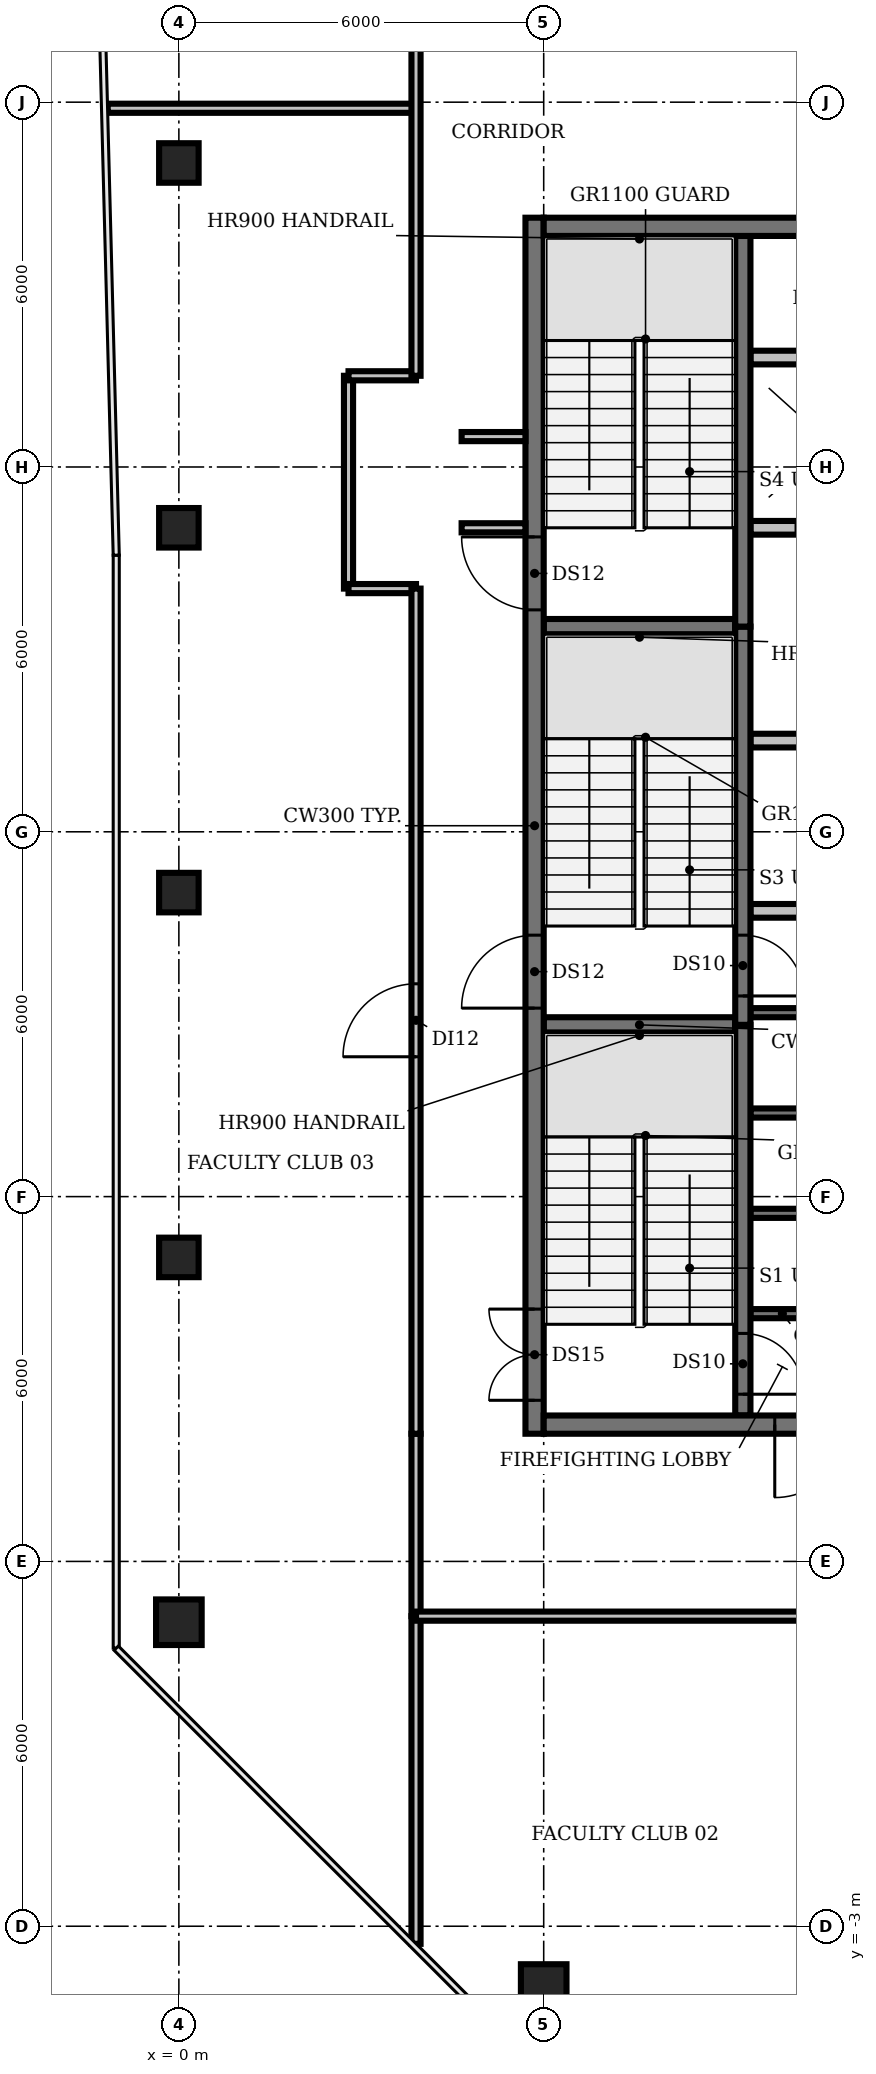
"""IFC4 building model, lengths in metres.
Left out: names, types, materials, properties, quantities, classifications, styles, units other than length and angle.
Written with IfcOpenShell. Run it as: python <this file> out.ifc"""

import sys

from ifc_helpers import new_model, si_unit, direction, frame, frame_2d, origin, origin_2d, place, context, subcontext, project, spatial, rectangle, circle, extrude, element, fill, save


model = new_model("IFC4")
c1 = context("Model", 3, precision=1e-05, world=origin(), true_north=direction((0.0, 1.0)))
c2 = subcontext(c1, "Body", "Model", "MODEL_VIEW")
j1 = project(units=[si_unit("LENGTHUNIT", "METRE"), si_unit("PLANEANGLEUNIT", "RADIAN")], contexts=[c1])
p1 = place(None, origin())
s1 = spatial("IfcSite", under=j1, at=p1, CompositionType="ELEMENT")
p2 = place(p1, origin())
s2 = spatial("IfcBuilding", under=s1, at=p2, CompositionType="ELEMENT")
p3 = place(p2, frame((0.0, 0.0, 327.2)))
s3 = spatial("IfcBuildingStorey", under=s2, at=p3, CompositionType="ELEMENT", Elevation=327.2)
p4 = place(p3, frame((0.0, 2.0, 0.0), z_axis=(0.0, 0.0, 1.0), x_axis=(1.0, 0.0, 0.0)))
e1 = element("IfcColumn", 1, at=p4, inside=s3, PredefinedType="COLUMN", context=c2, shape_type="SweptSolid", body=[
    extrude(circle(Radius=0.375, at=origin_2d()), origin(), (0.0, 0.0, 1.0), 3.9),
])
for number, where, z_axis, x_axis in (
    (2, (0.0, 8.0, 0.0), (0.0, 0.0, 1.0), (1.0, 0.0, 0.0)),
    (3, (0.0, 14.0, 0.0), (0.0, 0.0, 1.0), (1.0, 0.0, 0.0)),
    (4, (0.0, 20.0, 0.0), (0.0, 0.0, 1.0), (1.0, 0.0, 0.0)),
    (5, (0.0, 26.0, 0.0), (0.0, 0.0, 1.0), (1.0, 0.0, 0.0)),
):
    element("IfcColumn", number, at=place(p3, frame(where, z_axis=z_axis, x_axis=x_axis)), inside=s3, PredefinedType="COLUMN", context=c2, shape_type="SweptSolid", body=[
        extrude(rectangle(XDim=0.65, YDim=0.65, at=origin_2d()), origin(), (0.0, 0.0, 1.0), 3.9),
    ])
p5 = place(p3, frame((6.0, -4.0, 0.0), z_axis=(0.0, 0.0, 1.0), x_axis=(1.0, 0.0, 0.0)))
e6 = element("IfcColumn", 6, at=p5, inside=s3, PredefinedType="COLUMN", context=c2, shape_type="SweptSolid", body=[
    extrude(circle(Radius=0.375, at=origin_2d()), origin(), (0.0, 0.0, 1.0), 3.9),
])
for number, where, z_axis, x_axis in (
    (7, (9.4, 7.075, 0.0), (0.0, 0.0, 1.0), (1.0, 0.0, 0.0)),
    (8, (9.4, 8.725, 0.0), (0.0, 0.0, 1.0), (1.0, 0.0, 0.0)),
    (9, (9.4, 10.375, 0.0), (0.0, 0.0, 1.0), (1.0, 0.0, 0.0)),
):
    element("IfcWall", number, at=place(p3, frame(where, z_axis=z_axis, x_axis=x_axis)), inside=s3, PredefinedType="SHEAR", context=c2, shape_type="SweptSolid", body=[
        extrude(rectangle(XDim=1.05, YDim=0.15, at=frame_2d((0.525, 0.0))), origin(), (0.0, 0.0, 1.0), 3.9),
    ])
p6 = place(p3, frame((6.0, 11.825, 0.0), z_axis=(0.0, 0.0, 1.0), x_axis=(1.0, 0.0, 0.0)))
e10 = element("IfcWall", 10, at=p6, inside=s3, PredefinedType="SHEAR", context=c2, shape_type="SweptSolid", body=[
    extrude(rectangle(XDim=3.15, YDim=0.25, at=frame_2d((1.575, 0.0))), origin(), (0.0, 0.0, 1.0), 3.9),
])
p7 = place(p3, frame((9.4, 12.025, 0.0), z_axis=(0.0, 0.0, 1.0), x_axis=(1.0, 0.0, 0.0)))
e11 = element("IfcWall", 11, at=p7, inside=s3, PredefinedType="SHEAR", context=c2, shape_type="SweptSolid", body=[
    extrude(rectangle(XDim=1.05, YDim=0.15, at=frame_2d((0.525, 0.0))), origin(), (0.0, 0.0, 1.0), 3.9),
])
p8 = place(p3, frame((9.4, 13.7, 0.0), z_axis=(0.0, 0.0, 1.0), x_axis=(1.0, 0.0, 0.0)))
e12 = element("IfcWall", 12, at=p8, inside=s3, PredefinedType="PARTITIONING", context=c2, shape_type="SweptSolid", body=[
    extrude(rectangle(XDim=4.0, YDim=0.225, at=frame_2d((2.0, 0.0))), origin(), (0.0, 0.0, 1.0), 3.9),
])
p9 = place(p3, frame((9.4, 16.5, 0.0), z_axis=(0.0, 0.0, 1.0), x_axis=(1.0, 0.0, 0.0)))
e13 = element("IfcWall", 13, at=p9, inside=s3, PredefinedType="PARTITIONING", context=c2, shape_type="SweptSolid", body=[
    extrude(rectangle(XDim=14.6, YDim=0.225, at=frame_2d((7.3, 0.0))), origin(), (0.0, 0.0, 1.0), 3.9),
])
p10 = place(p9, frame((1.9, 0.0, 0.0)))
e14 = element("IfcOpeningElement", 14, at=p10, cuts=e13, PredefinedType="OPENING", context=c2, shape_type="SweptSolid", body=[
    extrude(rectangle(XDim=1.0, YDim=2.1, at=frame_2d((0.5, 1.05))), frame((0.0, 0.123, 0.0), z_axis=(0.0, -1.0, 0.0), x_axis=(1.0, 0.0, 0.0)), (0.0, 0.0, 1.0), 0.245),
])
p11 = place(p9, frame((7.475, 0.0, 0.0)))
e15 = element("IfcOpeningElement", 15, at=p11, cuts=e13, PredefinedType="OPENING", context=c2, shape_type="SweptSolid", body=[
    extrude(rectangle(XDim=1.0, YDim=2.1, at=frame_2d((0.5, 1.05))), frame((0.0, 0.123, 0.0), z_axis=(0.0, -1.0, 0.0), x_axis=(1.0, 0.0, 0.0)), (0.0, 0.0, 1.0), 0.245),
])
p12 = place(p9, frame((11.647, 0.0, 0.0)))
e16 = element("IfcOpeningElement", 16, at=p12, cuts=e13, PredefinedType="OPENING", context=c2, shape_type="SweptSolid", body=[
    extrude(rectangle(XDim=0.9, YDim=2.1, at=frame_2d((0.45, 1.05))), frame((0.0, 0.123, 0.0), z_axis=(0.0, -1.0, 0.0), x_axis=(1.0, 0.0, 0.0)), (0.0, 0.0, 1.0), 0.245),
])
p13 = place(p9, frame((13.423, 0.0, 0.0)))
e17 = element("IfcOpeningElement", 17, at=p13, cuts=e13, PredefinedType="OPENING", context=c2, shape_type="SweptSolid", body=[
    extrude(rectangle(XDim=0.9, YDim=2.1, at=frame_2d((0.45, 1.05))), frame((0.0, 0.123, 0.0), z_axis=(0.0, -1.0, 0.0), x_axis=(1.0, 0.0, 0.0)), (0.0, 0.0, 1.0), 0.245),
])
p14 = place(p3, frame((6.0, 18.375, 0.0), z_axis=(0.0, 0.0, 1.0), x_axis=(1.0, 0.0, 0.0)))
e18 = element("IfcWall", 18, at=p14, inside=s3, PredefinedType="SHEAR", context=c2, shape_type="SweptSolid", body=[
    extrude(rectangle(XDim=3.15, YDim=0.25, at=frame_2d((1.575, 0.0))), origin(), (0.0, 0.0, 1.0), 3.9),
])
p15 = place(p3, frame((24.0, 20.0, 0.0), z_axis=(0.0, 0.0, 1.0), x_axis=(-1.0, 0.0, 0.0)))
e19 = element("IfcWall", 19, at=p15, inside=s3, PredefinedType="PARTITIONING", context=c2, shape_type="SweptSolid", body=[
    extrude(rectangle(XDim=14.6, YDim=0.225, at=frame_2d((7.3, 0.0))), origin(), (0.0, 0.0, 1.0), 3.9),
])
p16 = place(p15, frame((12.75, 0.0, 0.0)))
e20 = element("IfcOpeningElement", 20, at=p16, cuts=e19, PredefinedType="OPENING", context=c2, shape_type="SweptSolid", body=[
    extrude(rectangle(XDim=1.1, YDim=2.1, at=frame_2d((0.55, 1.05))), frame((0.0, 0.123, 0.0), z_axis=(0.0, -1.0, 0.0), x_axis=(1.0, 0.0, 0.0)), (0.0, 0.0, 1.0), 0.245),
])
p17 = place(p15, frame((9.95, 0.0, 0.0)))
e21 = element("IfcOpeningElement", 21, at=p17, cuts=e19, PredefinedType="OPENING", context=c2, shape_type="SweptSolid", body=[
    extrude(rectangle(XDim=1.1, YDim=2.1, at=frame_2d((0.55, 1.05))), frame((0.0, 0.123, 0.0), z_axis=(0.0, -1.0, 0.0), x_axis=(1.0, 0.0, 0.0)), (0.0, 0.0, 1.0), 0.245),
])
p18 = place(p15, frame((7.15, 0.0, 0.0)))
e22 = element("IfcOpeningElement", 22, at=p18, cuts=e19, PredefinedType="OPENING", context=c2, shape_type="SweptSolid", body=[
    extrude(rectangle(XDim=1.1, YDim=2.1, at=frame_2d((0.55, 1.05))), frame((0.0, 0.123, 0.0), z_axis=(0.0, -1.0, 0.0), x_axis=(1.0, 0.0, 0.0)), (0.0, 0.0, 1.0), 0.245),
])
p19 = place(p15, frame((4.35, 0.0, 0.0)))
e23 = element("IfcOpeningElement", 23, at=p19, cuts=e19, PredefinedType="OPENING", context=c2, shape_type="SweptSolid", body=[
    extrude(rectangle(XDim=1.1, YDim=2.1, at=frame_2d((0.55, 1.05))), frame((0.0, 0.123, 0.0), z_axis=(0.0, -1.0, 0.0), x_axis=(1.0, 0.0, 0.0)), (0.0, 0.0, 1.0), 0.245),
])
p20 = place(p15, frame((2.137, 0.0, 0.0)))
e24 = element("IfcOpeningElement", 24, at=p20, cuts=e19, PredefinedType="OPENING", context=c2, shape_type="SweptSolid", body=[
    extrude(rectangle(XDim=0.9, YDim=2.1, at=frame_2d((0.45, 1.05))), frame((0.0, 0.123, 0.0), z_axis=(0.0, -1.0, 0.0), x_axis=(1.0, 0.0, 0.0)), (0.0, 0.0, 1.0), 0.245),
])
p21 = place(p15, frame((0.562, 0.0, 0.0)))
e25 = element("IfcOpeningElement", 25, at=p21, cuts=e19, PredefinedType="OPENING", context=c2, shape_type="SweptSolid", body=[
    extrude(rectangle(XDim=0.9, YDim=2.1, at=frame_2d((0.45, 1.05))), frame((0.0, 0.123, 0.0), z_axis=(0.0, -1.0, 0.0), x_axis=(1.0, 0.0, 0.0)), (0.0, 0.0, 1.0), 0.245),
])
p22 = place(p3, frame((9.4, 22.8, 0.0), z_axis=(0.0, 0.0, 1.0), x_axis=(1.0, 0.0, 0.0)))
e26 = element("IfcWall", 26, at=p22, inside=s3, PredefinedType="PARTITIONING", context=c2, shape_type="SweptSolid", body=[
    extrude(rectangle(XDim=14.6, YDim=0.225, at=frame_2d((7.3, 0.0))), origin(), (0.0, 0.0, 1.0), 3.9),
])
p23 = place(p3, frame((9.275, 11.825, 0.0), z_axis=(0.0, 0.0, 1.0), x_axis=(0.0, -1.0, 0.0)))
e27 = element("IfcWall", 27, at=p23, inside=s3, PredefinedType="SHEAR", context=c2, shape_type="SweptSolid", body=[
    extrude(rectangle(XDim=6.425, YDim=0.25, at=frame_2d((3.212, 0.0))), origin(), (0.0, 0.0, 1.0), 3.9),
])
p24 = place(p23, frame((5.075, 0.0, 0.0)))
e28 = element("IfcOpeningElement", 28, at=p24, cuts=e27, PredefinedType="OPENING", context=c2, shape_type="SweptSolid", body=[
    extrude(rectangle(XDim=1.0, YDim=2.1, at=frame_2d((0.5, 1.05))), frame((0.0, 0.135, 0.0), z_axis=(0.0, -1.0, 0.0), x_axis=(1.0, 0.0, 0.0)), (0.0, 0.0, 1.0), 0.27),
])
p25 = place(p3, frame((9.275, 18.375, 0.0), z_axis=(0.0, 0.0, 1.0), x_axis=(0.0, -1.0, 0.0)))
e29 = element("IfcWall", 29, at=p25, inside=s3, PredefinedType="SHEAR", context=c2, shape_type="SweptSolid", body=[
    extrude(rectangle(XDim=6.55, YDim=0.25, at=frame_2d((3.275, 0.0))), origin(), (0.0, 0.0, 1.0), 3.9),
])
p26 = place(p25, frame((5.075, 0.0, 0.0)))
e30 = element("IfcOpeningElement", 30, at=p26, cuts=e29, PredefinedType="OPENING", context=c2, shape_type="SweptSolid", body=[
    extrude(rectangle(XDim=1.0, YDim=2.1, at=frame_2d((0.5, 1.05))), frame((0.0, 0.135, 0.0), z_axis=(0.0, -1.0, 0.0), x_axis=(1.0, 0.0, 0.0)), (0.0, 0.0, 1.0), 0.27),
])
p27 = place(p3, frame((9.275, 18.375, 0.0), z_axis=(0.0, 0.0, 1.0), x_axis=(0.0, 1.0, 0.0)))
e31 = element("IfcWall", 31, at=p27, inside=s3, PredefinedType="SHEAR", context=c2, shape_type="SweptSolid", body=[
    extrude(rectangle(XDim=6.425, YDim=0.25, at=frame_2d((3.212, 0.0))), origin(), (0.0, 0.0, 1.0), 3.9),
])
p28 = place(p3, frame((5.85, 5.1, 0.0), z_axis=(0.0, 0.0, 1.0), x_axis=(0.0, 1.0, 0.0)))
e32 = element("IfcWall", 32, at=p28, inside=s3, PredefinedType="SHEAR", context=c2, shape_type="SweptSolid", body=[
    extrude(rectangle(XDim=20.0, YDim=0.3, at=frame_2d((10.0, 0.0))), origin(), (0.0, 0.0, 1.0), 3.9),
])
p29 = place(p28, frame((0.55, 0.0, 0.0)))
e33 = element("IfcOpeningElement", 33, at=p29, cuts=e32, PredefinedType="OPENING", context=c2, shape_type="SweptSolid", body=[
    extrude(rectangle(XDim=1.5, YDim=2.1, at=frame_2d((0.75, 1.05))), frame((0.0, 0.16, 0.0), z_axis=(0.0, -1.0, 0.0), x_axis=(1.0, 0.0, 0.0)), (0.0, 0.0, 1.0), 0.32),
])
p30 = place(p28, frame((7.0, 0.0, 0.0)))
e34 = element("IfcOpeningElement", 34, at=p30, cuts=e32, PredefinedType="OPENING", context=c2, shape_type="SweptSolid", body=[
    extrude(rectangle(XDim=1.2, YDim=2.1, at=frame_2d((0.6, 1.05))), frame((0.0, 0.16, 0.0), z_axis=(0.0, -1.0, 0.0), x_axis=(1.0, 0.0, 0.0)), (0.0, 0.0, 1.0), 0.32),
])
p31 = place(p28, frame((13.55, 0.0, 0.0)))
e35 = element("IfcOpeningElement", 35, at=p31, cuts=e32, PredefinedType="OPENING", context=c2, shape_type="SweptSolid", body=[
    extrude(rectangle(XDim=1.2, YDim=2.1, at=frame_2d((0.6, 1.05))), frame((0.0, 0.16, 0.0), z_axis=(0.0, -1.0, 0.0), x_axis=(1.0, 0.0, 0.0)), (0.0, 0.0, 1.0), 0.32),
])
p32 = place(p3, frame((24.0, 5.25, 0.0), z_axis=(0.0, 0.0, 1.0), x_axis=(-1.0, 0.0, 0.0)))
e36 = element("IfcWall", 36, at=p32, inside=s3, PredefinedType="SHEAR", context=c2, shape_type="SweptSolid", body=[
    extrude(rectangle(XDim=18.0, YDim=0.3, at=frame_2d((9.0, 0.0))), origin(), (0.0, 0.0, 1.0), 3.9),
])
p33 = place(p32, frame((13.0, 0.0, 0.0)))
e37 = element("IfcOpeningElement", 37, at=p33, cuts=e36, PredefinedType="OPENING", context=c2, shape_type="SweptSolid", body=[
    extrude(rectangle(XDim=1.2, YDim=2.1, at=frame_2d((0.6, 1.05))), frame((0.0, 0.16, 0.0), z_axis=(0.0, -1.0, 0.0), x_axis=(1.0, 0.0, 0.0)), (0.0, 0.0, 1.0), 0.32),
])
p34 = place(p32, frame((4.9, 0.0, 0.0)))
e38 = element("IfcOpeningElement", 38, at=p34, cuts=e36, PredefinedType="OPENING", context=c2, shape_type="SweptSolid", body=[
    extrude(rectangle(XDim=1.0, YDim=2.1, at=frame_2d((0.5, 1.05))), frame((0.0, 0.16, 0.0), z_axis=(0.0, -1.0, 0.0), x_axis=(1.0, 0.0, 0.0)), (0.0, 0.0, 1.0), 0.32),
])
p35 = place(p3, frame((6.0, 24.95, 0.0), z_axis=(0.0, 0.0, 1.0), x_axis=(1.0, 0.0, 0.0)))
e39 = element("IfcWall", 39, at=p35, inside=s3, PredefinedType="SHEAR", context=c2, shape_type="SweptSolid", body=[
    extrude(rectangle(XDim=18.0, YDim=0.3, at=frame_2d((9.0, 0.0))), origin(), (0.0, 0.0, 1.0), 3.9),
])
p36 = place(p3, frame((-1.17, 26.9, 0.0), z_axis=(0.0, 0.0, 1.0), x_axis=(1.0, 0.0, 0.0)))
e40 = element("IfcWall", 40, at=p36, inside=s3, PredefinedType="PARTITIONING", context=c2, shape_type="SweptSolid", body=[
    extrude(rectangle(XDim=5.07, YDim=0.15, at=frame_2d((2.535, 0.0))), origin(), (0.0, 0.0, 1.0), 2.95),
])
p37 = place(p3, frame((2.79, 19.0, 0.0), z_axis=(0.0, 0.0, 1.0), x_axis=(0.0, 1.0, 0.0)))
e41 = element("IfcWall", 41, at=p37, inside=s3, PredefinedType="PARTITIONING", context=c2, shape_type="SweptSolid", body=[
    extrude(rectangle(XDim=3.5, YDim=0.15, at=frame_2d((1.75, 0.0))), origin(), (0.0, 0.0, 1.0), 2.95),
])
for number, where, z_axis, x_axis in (
    (42, (2.79, 19.0, 0.0), (0.0, 0.0, 1.0), (1.0, 0.0, 0.0)),
    (43, (2.79, 22.5, 0.0), (0.0, 0.0, 1.0), (1.0, 0.0, 0.0)),
):
    element("IfcWall", number, at=place(p3, frame(where, z_axis=z_axis, x_axis=x_axis)), inside=s3, PredefinedType="PARTITIONING", context=c2, shape_type="SweptSolid", body=[
        extrude(rectangle(XDim=1.11, YDim=0.15, at=frame_2d((0.555, 0.0))), origin(), (0.0, 0.0, 1.0), 2.95),
    ])
p38 = place(p3, frame((3.9, -3.29, 0.0), z_axis=(0.0, 0.0, 1.0), x_axis=(0.0, 1.0, 0.0)))
e44 = element("IfcWall", 44, at=p38, inside=s3, PredefinedType="PARTITIONING", context=c2, shape_type="SweptSolid", body=[
    extrude(rectangle(XDim=5.39, YDim=0.15, at=frame_2d((2.695, 0.0))), origin(), (0.0, 0.0, 1.0), 2.95),
])
p39 = place(p3, frame((3.9, 2.1, 0.0), z_axis=(0.0, 0.0, 1.0), x_axis=(0.0, 1.0, 0.0)))
e45 = element("IfcWall", 45, at=p39, inside=s3, PredefinedType="PARTITIONING", context=c2, shape_type="SweptSolid", body=[
    extrude(rectangle(XDim=3.0, YDim=0.15, at=frame_2d((1.5, 0.0))), origin(), (0.0, 0.0, 1.0), 2.95),
])
p40 = place(p3, frame((3.9, 5.1, 0.0), z_axis=(0.0, 0.0, 1.0), x_axis=(0.0, 1.0, 0.0)))
e46 = element("IfcWall", 46, at=p40, inside=s3, PredefinedType="PARTITIONING", context=c2, shape_type="SweptSolid", body=[
    extrude(rectangle(XDim=13.9, YDim=0.15, at=frame_2d((6.95, 0.0))), origin(), (0.0, 0.0, 1.0), 2.95),
])
p41 = place(p40, frame((6.2, 0.0, 0.0)))
e47 = element("IfcOpeningElement", 47, at=p41, cuts=e46, PredefinedType="OPENING", context=c2, shape_type="SweptSolid", body=[
    extrude(rectangle(XDim=1.2, YDim=2.1, at=frame_2d((0.6, 1.05))), frame((0.0, 0.085, 0.0), z_axis=(0.0, -1.0, 0.0), x_axis=(1.0, 0.0, 0.0)), (0.0, 0.0, 1.0), 0.17),
])
p42 = place(p3, frame((3.9, 22.5, 0.0), z_axis=(0.0, 0.0, 1.0), x_axis=(0.0, 1.0, 0.0)))
e48 = element("IfcWall", 48, at=p42, inside=s3, PredefinedType="PARTITIONING", context=c2, shape_type="SweptSolid", body=[
    extrude(rectangle(XDim=5.6, YDim=0.15, at=frame_2d((2.8, 0.0))), origin(), (0.0, 0.0, 1.0), 2.95),
])
for number, where, z_axis, x_axis in (
    (49, (4.65, 20.0, 0.0), (0.0, 0.0, 1.0), (1.0, 0.0, 0.0)),
    (50, (4.65, 21.5, 0.0), (0.0, 0.0, 1.0), (1.0, 0.0, 0.0)),
):
    element("IfcWall", number, at=place(p3, frame(where, z_axis=z_axis, x_axis=x_axis)), inside=s3, PredefinedType="PARTITIONING", context=c2, shape_type="SweptSolid", body=[
        extrude(rectangle(XDim=1.05, YDim=0.15, at=frame_2d((0.525, 0.0))), origin(), (0.0, 0.0, 1.0), 2.95),
    ])
p43 = place(p3, frame((26.1, 2.1, 0.0), z_axis=(0.0, 0.0, 1.0), x_axis=(-1.0, 0.0, 0.0)))
e51 = element("IfcWall", 51, at=p43, inside=s3, PredefinedType="PARTITIONING", context=c2, shape_type="SweptSolid", body=[
    extrude(rectangle(XDim=22.2, YDim=0.15, at=frame_2d((11.1, 0.0))), origin(), (0.0, 0.0, 1.0), 2.95),
])
p44 = place(p43, frame((10.6, 0.0, 0.0)))
e52 = element("IfcOpeningElement", 52, at=p44, cuts=e51, PredefinedType="OPENING", context=c2, shape_type="SweptSolid", body=[
    extrude(rectangle(XDim=1.2, YDim=2.1, at=frame_2d((0.6, 1.05))), frame((0.0, 0.085, 0.0), z_axis=(0.0, -1.0, 0.0), x_axis=(1.0, 0.0, 0.0)), (0.0, 0.0, 1.0), 0.17),
])
p45 = place(p24, origin())
e53 = element("IfcDoor", 53, at=p45, inside=s3, OperationType="SINGLE_SWING_RIGHT", PredefinedType="DOOR", context=c2, shape_type="SweptSolid", body=[
    extrude(rectangle(XDim=1.0, YDim=2.1, at=frame_2d((0.5, 1.05))), frame((0.0, 0.025, 0.0), z_axis=(0.0, -1.0, 0.0), x_axis=(1.0, 0.0, 0.0)), (0.0, 0.0, 1.0), 0.05),
])
fill(e28, e53)
p46 = place(p26, origin())
e54 = element("IfcDoor", 54, at=p46, inside=s3, OperationType="SINGLE_SWING_RIGHT", PredefinedType="DOOR", context=c2, shape_type="SweptSolid", body=[
    extrude(rectangle(XDim=1.0, YDim=2.1, at=frame_2d((0.5, 1.05))), frame((0.0, 0.025, 0.0), z_axis=(0.0, -1.0, 0.0), x_axis=(1.0, 0.0, 0.0)), (0.0, 0.0, 1.0), 0.05),
])
fill(e30, e54)
p47 = place(p29, origin())
e55 = element("IfcDoor", 55, at=p47, inside=s3, OperationType="DOUBLE_DOOR_SINGLE_SWING", PredefinedType="DOOR", context=c2, shape_type="SweptSolid", body=[
    extrude(rectangle(XDim=1.5, YDim=2.1, at=frame_2d((0.75, 1.05))), frame((0.0, 0.025, 0.0), z_axis=(0.0, -1.0, 0.0), x_axis=(1.0, 0.0, 0.0)), (0.0, 0.0, 1.0), 0.05),
])
fill(e33, e55)
p48 = place(p30, origin())
e56 = element("IfcDoor", 56, at=p48, inside=s3, OperationType="SINGLE_SWING_LEFT", PredefinedType="DOOR", context=c2, shape_type="SweptSolid", body=[
    extrude(rectangle(XDim=1.2, YDim=2.1, at=frame_2d((0.6, 1.05))), frame((0.0, 0.025, 0.0), z_axis=(0.0, -1.0, 0.0), x_axis=(1.0, 0.0, 0.0)), (0.0, 0.0, 1.0), 0.05),
])
fill(e34, e56)
p49 = place(p31, origin())
e57 = element("IfcDoor", 57, at=p49, inside=s3, OperationType="SINGLE_SWING_RIGHT", PredefinedType="DOOR", context=c2, shape_type="SweptSolid", body=[
    extrude(rectangle(XDim=1.2, YDim=2.1, at=frame_2d((0.6, 1.05))), frame((0.0, 0.025, 0.0), z_axis=(0.0, -1.0, 0.0), x_axis=(1.0, 0.0, 0.0)), (0.0, 0.0, 1.0), 0.05),
])
fill(e35, e57)
p50 = place(p33, origin())
e58 = element("IfcDoor", 58, at=p50, inside=s3, OperationType="SINGLE_SWING_RIGHT", PredefinedType="DOOR", context=c2, shape_type="SweptSolid", body=[
    extrude(rectangle(XDim=1.2, YDim=2.1, at=frame_2d((0.6, 1.05))), frame((0.0, 0.025, 0.0), z_axis=(0.0, -1.0, 0.0), x_axis=(1.0, 0.0, 0.0)), (0.0, 0.0, 1.0), 0.05),
])
fill(e37, e58)
p51 = place(p41, origin())
e59 = element("IfcDoor", 59, at=p51, inside=s3, OperationType="SINGLE_SWING_LEFT", PredefinedType="DOOR", context=c2, shape_type="SweptSolid", body=[
    extrude(rectangle(XDim=1.2, YDim=2.1, at=frame_2d((0.6, 1.05))), frame((0.0, 0.025, 0.0), z_axis=(0.0, -1.0, 0.0), x_axis=(1.0, 0.0, 0.0)), (0.0, 0.0, 1.0), 0.05),
])
fill(e47, e59)
save(model, sys.argv[1])
